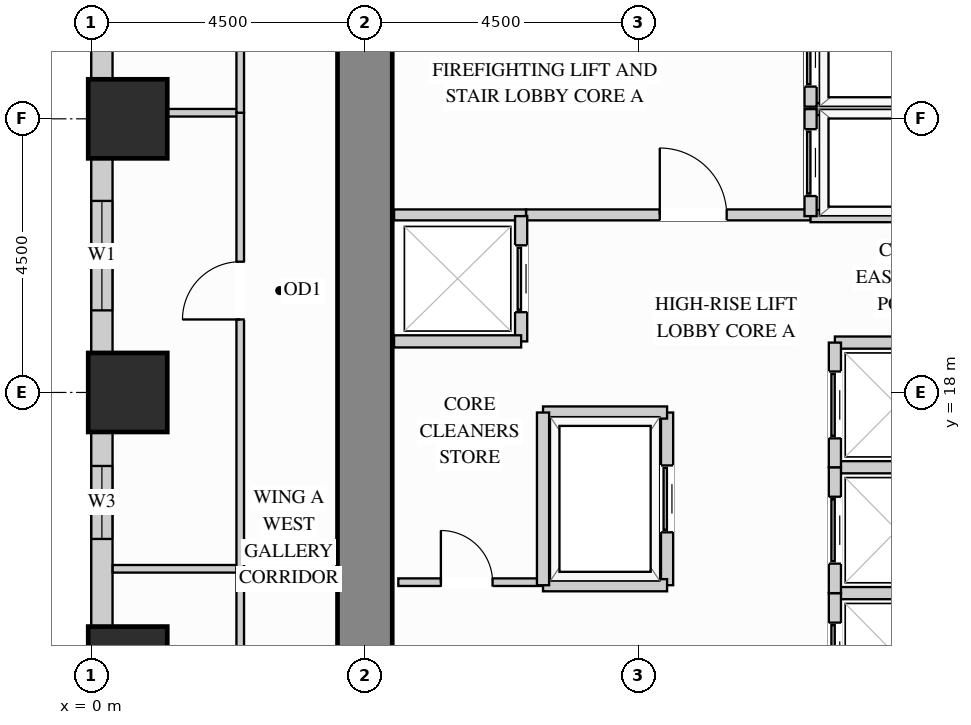
"""IFC4 building model, lengths in metres.
Left out: names, types, materials, properties, quantities, classifications, styles, units other than length and angle.
Written with IfcOpenShell. Run it as: python <this file> out.ifc"""

import sys

from ifc_helpers import new_model, si_unit, direction, frame, frame_2d, origin, origin_2d, place, context, subcontext, project, spatial, rectangle, extrude, source, transform, mapped, element, fill, save


model = new_model("IFC4")
c1 = context("Model", 3, precision=1e-05, world=origin(), true_north=direction((0.0, 1.0)))
c2 = subcontext(c1, "Body", "Model", "MODEL_VIEW")
j1 = project(units=[si_unit("LENGTHUNIT", "METRE"), si_unit("PLANEANGLEUNIT", "RADIAN")], contexts=[c1])
p1 = place(None, origin())
s1 = spatial("IfcSite", under=j1, at=p1, CompositionType="ELEMENT")
p2 = place(p1, origin())
s2 = spatial("IfcBuilding", under=s1, at=p2, CompositionType="ELEMENT")
p3 = place(p2, frame((0.0, 0.0, 58.5)))
s3 = spatial("IfcBuildingStorey", under=s2, at=p3, CompositionType="ELEMENT", Elevation=58.5)
m1 = source(origin(), c2, "Body", "SweptSolid", [
    extrude(rectangle(XDim=1.3, YDim=1.3, at=origin_2d()), origin(), (0.0, 0.0, 1.0), 3.38),
])
for number, where, z_axis, x_axis in (
    (1, (0.6, 13.5, 0.0), (0.0, 0.0, 1.0), (1.0, 0.0, 0.0)),
    (2, (0.6, 18.0, 0.0), (0.0, 0.0, 1.0), (1.0, 0.0, 0.0)),
    (3, (0.6, 22.5, 0.0), (0.0, 0.0, 1.0), (1.0, 0.0, 0.0)),
):
    element("IfcColumn", number, at=place(p3, frame(where, z_axis=z_axis, x_axis=x_axis)), inside=s3, PredefinedType="COLUMN", context=c2, shape_type="MappedRepresentation", body=[
        mapped(m1, transform((0.0, 0.0, 0.0), x_axis=(1.0, 0.0, 0.0), y_axis=(0.0, 1.0, 0.0), z_axis=(0.0, 0.0, 1.0))),
    ])
m2 = source(origin(), c2, "Body", "SweptSolid", [
    extrude(rectangle(XDim=20.1, YDim=0.9, at=frame_2d((10.05, 0.0))), origin(), (0.0, 0.0, 1.0), 3.38),
])
p4 = place(p3, frame((4.5, 8.95, 0.0), z_axis=(0.0, 0.0, 1.0), x_axis=(0.0, 1.0, 0.0)))
e4 = element("IfcWall", 4, at=p4, inside=s3, PredefinedType="SHEAR", context=c2, shape_type="MappedRepresentation", body=[
    mapped(m2, transform((0.0, 0.0, 0.0), x_axis=(1.0, 0.0, 0.0), y_axis=(0.0, 1.0, 0.0), z_axis=(0.0, 0.0, 1.0))),
])
p5 = place(p3, frame((0.175, 26.152, 0.0), z_axis=(0.0, 0.0, 1.0), x_axis=(0.0, -1.0, 0.0)))
e5 = element("IfcWall", 5, at=p5, inside=s3, PredefinedType="SOLIDWALL", context=c2, shape_type="SweptSolid", body=[
    extrude(rectangle(XDim=3.004, YDim=0.35, at=frame_2d((1.502, 0.0))), origin(), (0.0, 0.0, 1.0), 2.51),
])
p6 = place(p5, frame((0.602, 0.0, 0.78)))
e6 = element("IfcOpeningElement", 6, at=p6, cuts=e5, PredefinedType="OPENING", context=c2, shape_type="SweptSolid", body=[
    extrude(rectangle(XDim=1.8, YDim=1.55, at=frame_2d((0.9, 0.775))), frame((0.0, 0.185, 0.0), z_axis=(0.0, -1.0, 0.0), x_axis=(1.0, 0.0, 0.0)), (0.0, 0.0, 1.0), 0.37),
])
p7 = place(p3, frame((0.175, 21.852, 0.0), z_axis=(0.0, 0.0, 1.0), x_axis=(0.0, -1.0, 0.0)))
e7 = element("IfcWall", 7, at=p7, inside=s3, PredefinedType="SOLIDWALL", context=c2, shape_type="SweptSolid", body=[
    extrude(rectangle(XDim=3.204, YDim=0.35, at=frame_2d((1.602, 0.0))), origin(), (0.0, 0.0, 1.0), 2.51),
])
p8 = place(p7, frame((0.702, 0.0, 0.78)))
e8 = element("IfcOpeningElement", 8, at=p8, cuts=e7, PredefinedType="OPENING", context=c2, shape_type="SweptSolid", body=[
    extrude(rectangle(XDim=1.8, YDim=1.55, at=frame_2d((0.9, 0.775))), frame((0.0, 0.185, 0.0), z_axis=(0.0, -1.0, 0.0), x_axis=(1.0, 0.0, 0.0)), (0.0, 0.0, 1.0), 0.37),
])
p9 = place(p3, frame((0.175, 17.352, 0.0), z_axis=(0.0, 0.0, 1.0), x_axis=(0.0, -1.0, 0.0)))
e9 = element("IfcWall", 9, at=p9, inside=s3, PredefinedType="SOLIDWALL", context=c2, shape_type="SweptSolid", body=[
    extrude(rectangle(XDim=3.204, YDim=0.35, at=frame_2d((1.602, 0.0))), origin(), (0.0, 0.0, 1.0), 2.51),
])
p10 = place(p9, frame((0.561, 0.0, 0.78)))
e10 = element("IfcOpeningElement", 10, at=p10, cuts=e9, PredefinedType="OPENING", context=c2, shape_type="SweptSolid", body=[
    extrude(rectangle(XDim=1.2, YDim=1.55, at=frame_2d((0.6, 0.775))), frame((0.0, 0.185, 0.0), z_axis=(0.0, -1.0, 0.0), x_axis=(1.0, 0.0, 0.0)), (0.0, 0.0, 1.0), 0.37),
])
p11 = place(p3, frame((7.15, 20.92, 0.0), z_axis=(0.0, 0.0, 1.0), x_axis=(1.0, 0.0, 0.0)))
e11 = element("IfcWall", 11, at=p11, inside=s3, PredefinedType="PARTITIONING", context=c2, shape_type="SweptSolid", body=[
    extrude(rectangle(XDim=4.68, YDim=0.18, at=frame_2d((2.34, 0.0))), origin(), (0.0, 0.0, 1.0), 3.365),
])
p12 = place(p11, frame((2.2, 0.0, 0.0)))
e12 = element("IfcOpeningElement", 12, at=p12, cuts=e11, PredefinedType="OPENING", context=c2, shape_type="SweptSolid", body=[
    extrude(rectangle(XDim=1.1, YDim=2.15, at=frame_2d((0.55, 1.075))), frame((0.0, 0.1, 0.0), z_axis=(0.0, -1.0, 0.0), x_axis=(1.0, 0.0, 0.0)), (0.0, 0.0, 1.0), 0.2),
])
m3 = source(origin(), c2, "Body", "SweptSolid", [
    extrude(rectangle(XDim=2.17, YDim=0.18, at=frame_2d((1.085, 0.0))), origin(), (0.0, 0.0, 1.0), 3.365),
])
p13 = place(p3, frame((4.98, 20.92, 0.0), z_axis=(0.0, 0.0, 1.0), x_axis=(1.0, 0.0, 0.0)))
e13 = element("IfcWall", 13, at=p13, inside=s3, PredefinedType="PARTITIONING", context=c2, shape_type="MappedRepresentation", body=[
    mapped(m3, transform((0.0, 0.0, 0.0), x_axis=(1.0, 0.0, 0.0), y_axis=(0.0, 1.0, 0.0), z_axis=(0.0, 0.0, 1.0))),
])
p14 = place(p3, frame((5.05, 14.88, 0.0), z_axis=(0.0, 0.0, 1.0), x_axis=(1.0, 0.0, 0.0)))
e14 = element("IfcWall", 14, at=p14, inside=s3, PredefinedType="PARTITIONING", context=c2, shape_type="SweptSolid", body=[
    extrude(rectangle(XDim=2.35, YDim=0.125, at=frame_2d((1.175, 0.0))), origin(), (0.0, 0.0, 1.0), 3.365),
])
p15 = place(p14, frame((0.7, 0.0, 0.0)))
e15 = element("IfcOpeningElement", 15, at=p15, cuts=e14, PredefinedType="OPENING", context=c2, shape_type="SweptSolid", body=[
    extrude(rectangle(XDim=0.85, YDim=2.1, at=frame_2d((0.425, 1.05))), frame((0.0, 0.073, 0.0), z_axis=(0.0, -1.0, 0.0), x_axis=(1.0, 0.0, 0.0)), (0.0, 0.0, 1.0), 0.145),
])
m4 = source(origin(), c2, "Body", "SweptSolid", [
    extrude(rectangle(XDim=2.098, YDim=0.125, at=frame_2d((1.049, 0.0))), origin(), (0.0, 0.0, 1.0), 3.365),
])
p16 = place(p3, frame((0.352, 15.1, 0.0), z_axis=(0.0, 0.0, 1.0), x_axis=(1.0, 0.0, 0.0)))
e16 = element("IfcWall", 16, at=p16, inside=s3, PredefinedType="PARTITIONING", context=c2, shape_type="MappedRepresentation", body=[
    mapped(m4, transform((0.0, 0.0, 0.0), x_axis=(1.0, 0.0, 0.0), y_axis=(0.0, 1.0, 0.0), z_axis=(0.0, 0.0, 1.0))),
])
m5 = source(origin(), c2, "Body", "SweptSolid", [
    extrude(rectangle(XDim=1.19, YDim=0.125, at=frame_2d((0.595, 0.0))), origin(), (0.0, 0.0, 1.0), 3.365),
])
p17 = place(p3, frame((1.26, 22.6, 0.0), z_axis=(0.0, 0.0, 1.0), x_axis=(1.0, 0.0, 0.0)))
e17 = element("IfcWall", 17, at=p17, inside=s3, PredefinedType="PARTITIONING", context=c2, shape_type="MappedRepresentation", body=[
    mapped(m5, transform((0.0, 0.0, 0.0), x_axis=(1.0, 0.0, 0.0), y_axis=(0.0, 1.0, 0.0), z_axis=(0.0, 0.0, 1.0))),
])
p18 = place(p3, frame((2.45, 7.85, 0.0), z_axis=(0.0, 0.0, 1.0), x_axis=(0.0, 1.0, 0.0)))
e18 = element("IfcWall", 18, at=p18, inside=s3, PredefinedType="PARTITIONING", context=c2, shape_type="SweptSolid", body=[
    extrude(rectangle(XDim=7.25, YDim=0.125, at=frame_2d((3.625, 0.0))), origin(), (0.0, 0.0, 1.0), 3.365),
])
p19 = place(p18, frame((3.15, 0.0, 0.0)))
e19 = element("IfcOpeningElement", 19, at=p19, cuts=e18, PredefinedType="OPENING", context=c2, shape_type="SweptSolid", body=[
    extrude(rectangle(XDim=0.95, YDim=2.15, at=frame_2d((0.475, 1.075))), frame((0.0, 0.073, 0.0), z_axis=(0.0, -1.0, 0.0), x_axis=(1.0, 0.0, 0.0)), (0.0, 0.0, 1.0), 0.145),
])
p20 = place(p3, frame((2.45, 15.1, 0.0), z_axis=(0.0, 0.0, 1.0), x_axis=(0.0, 1.0, 0.0)))
e20 = element("IfcWall", 20, at=p20, inside=s3, PredefinedType="PARTITIONING", context=c2, shape_type="SweptSolid", body=[
    extrude(rectangle(XDim=7.5, YDim=0.125, at=frame_2d((3.75, 0.0))), origin(), (0.0, 0.0, 1.0), 3.365),
])
p21 = place(p20, frame((4.1, 0.0, 0.0)))
e21 = element("IfcOpeningElement", 21, at=p21, cuts=e20, PredefinedType="OPENING", context=c2, shape_type="SweptSolid", body=[
    extrude(rectangle(XDim=0.95, YDim=2.15, at=frame_2d((0.475, 1.075))), frame((0.0, 0.073, 0.0), z_axis=(0.0, -1.0, 0.0), x_axis=(1.0, 0.0, 0.0)), (0.0, 0.0, 1.0), 0.145),
])
p22 = place(p3, frame((2.45, 22.6, 0.0), z_axis=(0.0, 0.0, 1.0), x_axis=(0.0, 1.0, 0.0)))
e22 = element("IfcWall", 22, at=p22, inside=s3, PredefinedType="PARTITIONING", context=c2, shape_type="SweptSolid", body=[
    extrude(rectangle(XDim=7.45, YDim=0.125, at=frame_2d((3.725, 0.0))), origin(), (0.0, 0.0, 1.0), 3.365),
])
p23 = place(p22, frame((2.227, 0.0, 0.0)))
e23 = element("IfcOpeningElement", 23, at=p23, cuts=e22, PredefinedType="OPENING", context=c2, shape_type="SweptSolid", body=[
    extrude(rectangle(XDim=0.95, YDim=2.15, at=frame_2d((0.475, 1.075))), frame((0.0, 0.073, 0.0), z_axis=(0.0, -1.0, 0.0), x_axis=(1.0, 0.0, 0.0)), (0.0, 0.0, 1.0), 0.145),
])
m6 = source(origin(), c2, "Body", "SweptSolid", [
    extrude(rectangle(XDim=2.19, YDim=0.2, at=frame_2d((1.095, 0.0))), origin(), (0.0, 0.0, 1.0), 3.365),
])
for number, where, z_axis, x_axis in (
    (24, (11.83, 22.66, 0.0), (0.0, 0.0, 1.0), (1.0, 0.0, 0.0)),
    (25, (11.83, 20.9, 0.0), (0.0, 0.0, 1.0), (1.0, 0.0, 0.0)),
):
    element("IfcWall", number, at=place(p3, frame(where, z_axis=z_axis, x_axis=x_axis)), inside=s3, PredefinedType="PARTITIONING", context=c2, shape_type="MappedRepresentation", body=[
        mapped(m6, transform((0.0, 0.0, 0.0), x_axis=(1.0, 0.0, 0.0), y_axis=(0.0, 1.0, 0.0), z_axis=(0.0, 0.0, 1.0))),
    ])
p24 = place(p3, frame((11.83, 20.9, 0.0), z_axis=(0.0, 0.0, 1.0), x_axis=(0.0, 1.0, 0.0)))
e26 = element("IfcWall", 26, at=p24, inside=s3, PredefinedType="PARTITIONING", context=c2, shape_type="SweptSolid", body=[
    extrude(rectangle(XDim=1.76, YDim=0.2, at=frame_2d((0.88, 0.0))), origin(), (0.0, 0.0, 1.0), 3.365),
])
p25 = place(p24, frame((0.33, 0.0, 0.0)))
e27 = element("IfcOpeningElement", 27, at=p25, cuts=e26, PredefinedType="OPENING", context=c2, shape_type="SweptSolid", body=[
    extrude(rectangle(XDim=1.1, YDim=2.2, at=frame_2d((0.55, 1.1))), frame((0.0, 0.11, 0.0), z_axis=(0.0, -1.0, 0.0), x_axis=(1.0, 0.0, 0.0)), (0.0, 0.0, 1.0), 0.22),
])
p26 = place(p3, frame((11.83, 22.7, 0.0), z_axis=(0.0, 0.0, 1.0), x_axis=(0.0, 1.0, 0.0)))
e28 = element("IfcWall", 28, at=p26, inside=s3, PredefinedType="PARTITIONING", context=c2, shape_type="SweptSolid", body=[
    extrude(rectangle(XDim=1.76, YDim=0.2, at=frame_2d((0.88, 0.0))), origin(), (0.0, 0.0, 1.0), 3.365),
])
p27 = place(p26, frame((0.33, 0.0, 0.0)))
e29 = element("IfcOpeningElement", 29, at=p27, cuts=e28, PredefinedType="OPENING", context=c2, shape_type="SweptSolid", body=[
    extrude(rectangle(XDim=1.1, YDim=2.2, at=frame_2d((0.55, 1.1))), frame((0.0, 0.11, 0.0), z_axis=(0.0, -1.0, 0.0), x_axis=(1.0, 0.0, 0.0)), (0.0, 0.0, 1.0), 0.22),
])
m7 = source(origin(), c2, "Body", "SweptSolid", [
    extrude(rectangle(XDim=1.79, YDim=0.2, at=frame_2d((0.895, 0.0))), origin(), (0.0, 0.0, 1.0), 3.365),
])
p28 = place(p3, frame((12.23, 14.7, 0.0), z_axis=(0.0, 0.0, 1.0), x_axis=(1.0, 0.0, 0.0)))
e30 = element("IfcWall", 30, at=p28, inside=s3, PredefinedType="PARTITIONING", context=c2, shape_type="MappedRepresentation", body=[
    mapped(m7, transform((0.0, 0.0, 0.0), x_axis=(1.0, 0.0, 0.0), y_axis=(0.0, 1.0, 0.0), z_axis=(0.0, 0.0, 1.0))),
])
p29 = place(p3, frame((12.23, 12.63, 0.0), z_axis=(0.0, 0.0, 1.0), x_axis=(0.0, 1.0, 0.0)))
e31 = element("IfcWall", 31, at=p29, inside=s3, PredefinedType="PARTITIONING", context=c2, shape_type="SweptSolid", body=[
    extrude(rectangle(XDim=2.07, YDim=0.2, at=frame_2d((1.035, 0.0))), origin(), (0.0, 0.0, 1.0), 3.365),
])
p30 = place(p29, frame((0.485, 0.0, 0.0)))
e32 = element("IfcOpeningElement", 32, at=p30, cuts=e31, PredefinedType="OPENING", context=c2, shape_type="SweptSolid", body=[
    extrude(rectangle(XDim=1.1, YDim=2.2, at=frame_2d((0.55, 1.1))), frame((0.0, 0.11, 0.0), z_axis=(0.0, -1.0, 0.0), x_axis=(1.0, 0.0, 0.0)), (0.0, 0.0, 1.0), 0.22),
])
p31 = place(p3, frame((12.23, 16.77, 0.0), z_axis=(0.0, 0.0, 1.0), x_axis=(1.0, 0.0, 0.0)))
e33 = element("IfcWall", 33, at=p31, inside=s3, PredefinedType="PARTITIONING", context=c2, shape_type="MappedRepresentation", body=[
    mapped(m7, transform((0.0, 0.0, 0.0), x_axis=(1.0, 0.0, 0.0), y_axis=(0.0, 1.0, 0.0), z_axis=(0.0, 0.0, 1.0))),
])
p32 = place(p3, frame((12.23, 14.7, 0.0), z_axis=(0.0, 0.0, 1.0), x_axis=(0.0, 1.0, 0.0)))
e34 = element("IfcWall", 34, at=p32, inside=s3, PredefinedType="PARTITIONING", context=c2, shape_type="SweptSolid", body=[
    extrude(rectangle(XDim=2.07, YDim=0.2, at=frame_2d((1.035, 0.0))), origin(), (0.0, 0.0, 1.0), 3.365),
])
p33 = place(p32, frame((0.485, 0.0, 0.0)))
e35 = element("IfcOpeningElement", 35, at=p33, cuts=e34, PredefinedType="OPENING", context=c2, shape_type="SweptSolid", body=[
    extrude(rectangle(XDim=1.1, YDim=2.2, at=frame_2d((0.55, 1.1))), frame((0.0, 0.11, 0.0), z_axis=(0.0, -1.0, 0.0), x_axis=(1.0, 0.0, 0.0)), (0.0, 0.0, 1.0), 0.22),
])
p34 = place(p3, frame((12.23, 18.82, 0.0), z_axis=(0.0, 0.0, 1.0), x_axis=(1.0, 0.0, 0.0)))
e36 = element("IfcWall", 36, at=p34, inside=s3, PredefinedType="PARTITIONING", context=c2, shape_type="MappedRepresentation", body=[
    mapped(m7, transform((0.0, 0.0, 0.0), x_axis=(1.0, 0.0, 0.0), y_axis=(0.0, 1.0, 0.0), z_axis=(0.0, 0.0, 1.0))),
])
p35 = place(p3, frame((12.23, 16.77, 0.0), z_axis=(0.0, 0.0, 1.0), x_axis=(0.0, 1.0, 0.0)))
e37 = element("IfcWall", 37, at=p35, inside=s3, PredefinedType="PARTITIONING", context=c2, shape_type="SweptSolid", body=[
    extrude(rectangle(XDim=2.05, YDim=0.2, at=frame_2d((1.025, 0.0))), origin(), (0.0, 0.0, 1.0), 3.365),
])
p36 = place(p35, frame((0.475, 0.0, 0.0)))
e38 = element("IfcOpeningElement", 38, at=p36, cuts=e37, PredefinedType="OPENING", context=c2, shape_type="SweptSolid", body=[
    extrude(rectangle(XDim=1.1, YDim=2.2, at=frame_2d((0.55, 1.1))), frame((0.0, 0.11, 0.0), z_axis=(0.0, -1.0, 0.0), x_axis=(1.0, 0.0, 0.0)), (0.0, 0.0, 1.0), 0.22),
])
p37 = place(p3, frame((7.07, 18.84, 0.0), z_axis=(0.0, 0.0, 1.0), x_axis=(0.0, 1.0, 0.0)))
e39 = element("IfcWall", 39, at=p37, inside=s3, PredefinedType="PARTITIONING", context=c2, shape_type="SweptSolid", body=[
    extrude(rectangle(XDim=2.06, YDim=0.2, at=frame_2d((1.03, 0.0))), origin(), (0.0, 0.0, 1.0), 3.365),
])
p38 = place(p37, frame((0.48, 0.0, 0.0)))
e40 = element("IfcOpeningElement", 40, at=p38, cuts=e39, PredefinedType="OPENING", context=c2, shape_type="SweptSolid", body=[
    extrude(rectangle(XDim=1.1, YDim=2.2, at=frame_2d((0.55, 1.1))), frame((0.0, 0.11, 0.0), z_axis=(0.0, -1.0, 0.0), x_axis=(1.0, 0.0, 0.0)), (0.0, 0.0, 1.0), 0.22),
])
m8 = source(origin(), c2, "Body", "SweptSolid", [
    extrude(rectangle(XDim=2.09, YDim=0.2, at=frame_2d((1.045, 0.0))), origin(), (0.0, 0.0, 1.0), 3.365),
])
p39 = place(p3, frame((4.98, 18.84, 0.0), z_axis=(0.0, 0.0, 1.0), x_axis=(1.0, 0.0, 0.0)))
e41 = element("IfcWall", 41, at=p39, inside=s3, PredefinedType="PARTITIONING", context=c2, shape_type="MappedRepresentation", body=[
    mapped(m8, transform((0.0, 0.0, 0.0), x_axis=(1.0, 0.0, 0.0), y_axis=(0.0, 1.0, 0.0), z_axis=(0.0, 0.0, 1.0))),
])
p40 = place(p3, frame((9.47, 14.83, 0.0), z_axis=(0.0, 0.0, 1.0), x_axis=(0.0, 1.0, 0.0)))
e42 = element("IfcWall", 42, at=p40, inside=s3, PredefinedType="PARTITIONING", context=c2, shape_type="SweptSolid", body=[
    extrude(rectangle(XDim=2.84, YDim=0.2, at=frame_2d((1.42, 0.0))), origin(), (0.0, 0.0, 1.0), 3.365),
])
p41 = place(p40, frame((0.87, 0.0, 0.0)))
e43 = element("IfcOpeningElement", 43, at=p41, cuts=e42, PredefinedType="OPENING", context=c2, shape_type="SweptSolid", body=[
    extrude(rectangle(XDim=1.1, YDim=2.2, at=frame_2d((0.55, 1.1))), frame((0.0, 0.11, 0.0), z_axis=(0.0, -1.0, 0.0), x_axis=(1.0, 0.0, 0.0)), (0.0, 0.0, 1.0), 0.22),
])
m9 = source(origin(), c2, "Body", "SweptSolid", [
    extrude(rectangle(XDim=2.04, YDim=0.2, at=frame_2d((1.02, 0.0))), origin(), (0.0, 0.0, 1.0), 3.365),
])
for number, where, z_axis, x_axis in (
    (44, (7.43, 17.67, 0.0), (0.0, 0.0, 1.0), (1.0, 0.0, 0.0)),
    (45, (7.43, 14.83, 0.0), (0.0, 0.0, 1.0), (1.0, 0.0, 0.0)),
):
    element("IfcWall", number, at=place(p3, frame(where, z_axis=z_axis, x_axis=x_axis)), inside=s3, PredefinedType="PARTITIONING", context=c2, shape_type="MappedRepresentation", body=[
        mapped(m9, transform((0.0, 0.0, 0.0), x_axis=(1.0, 0.0, 0.0), y_axis=(0.0, 1.0, 0.0), z_axis=(0.0, 0.0, 1.0))),
    ])
m10 = source(origin(), c2, "Body", "SweptSolid", [
    extrude(rectangle(XDim=2.84, YDim=0.2, at=frame_2d((1.42, 0.0))), origin(), (0.0, 0.0, 1.0), 3.365),
])
p42 = place(p3, frame((7.43, 14.83, 0.0), z_axis=(0.0, 0.0, 1.0), x_axis=(0.0, 1.0, 0.0)))
e46 = element("IfcWall", 46, at=p42, inside=s3, PredefinedType="PARTITIONING", context=c2, shape_type="MappedRepresentation", body=[
    mapped(m10, transform((0.0, 0.0, 0.0), x_axis=(1.0, 0.0, 0.0), y_axis=(0.0, 1.0, 0.0), z_axis=(0.0, 0.0, 1.0))),
])
m11 = source(origin(), c2, "Body", "SweptSolid", [
    extrude(rectangle(XDim=1.1, YDim=2.15, at=frame_2d((0.55, 1.075))), frame((0.0, 0.025, 0.0), z_axis=(0.0, -1.0, 0.0), x_axis=(1.0, 0.0, 0.0)), (0.0, 0.0, 1.0), 0.05),
])
p43 = place(p12, origin())
e47 = element("IfcDoor", 47, at=p43, inside=s3, OperationType="SINGLE_SWING_LEFT", PredefinedType="DOOR", context=c2, shape_type="MappedRepresentation", body=[
    mapped(m11, transform((0.0, 0.0, 0.0), x_axis=(1.0, 0.0, 0.0), y_axis=(0.0, 1.0, 0.0), z_axis=(0.0, 0.0, 1.0))),
])
fill(e12, e47)
m12 = source(origin(), c2, "Body", "SweptSolid", [
    extrude(rectangle(XDim=1.1, YDim=2.2, at=frame_2d((0.55, 1.1))), frame((0.0, 0.025, 0.0), z_axis=(0.0, -1.0, 0.0), x_axis=(1.0, 0.0, 0.0)), (0.0, 0.0, 1.0), 0.05),
])
p44 = place(p25, origin())
e48 = element("IfcDoor", 48, at=p44, inside=s3, OperationType="SLIDING_TO_LEFT", PredefinedType="DOOR", context=c2, shape_type="MappedRepresentation", body=[
    mapped(m12, transform((0.0, 0.0, 0.0), x_axis=(1.0, 0.0, 0.0), y_axis=(0.0, 1.0, 0.0), z_axis=(0.0, 0.0, 1.0))),
])
fill(e27, e48)
p45 = place(p27, origin())
e49 = element("IfcDoor", 49, at=p45, inside=s3, OperationType="SLIDING_TO_LEFT", PredefinedType="DOOR", context=c2, shape_type="MappedRepresentation", body=[
    mapped(m12, transform((0.0, 0.0, 0.0), x_axis=(1.0, 0.0, 0.0), y_axis=(0.0, 1.0, 0.0), z_axis=(0.0, 0.0, 1.0))),
])
fill(e29, e49)
p46 = place(p30, origin())
e50 = element("IfcDoor", 50, at=p46, inside=s3, OperationType="SLIDING_TO_LEFT", PredefinedType="DOOR", context=c2, shape_type="MappedRepresentation", body=[
    mapped(m12, transform((0.0, 0.0, 0.0), x_axis=(1.0, 0.0, 0.0), y_axis=(0.0, 1.0, 0.0), z_axis=(0.0, 0.0, 1.0))),
])
fill(e32, e50)
p47 = place(p33, origin())
e51 = element("IfcDoor", 51, at=p47, inside=s3, OperationType="SLIDING_TO_LEFT", PredefinedType="DOOR", context=c2, shape_type="MappedRepresentation", body=[
    mapped(m12, transform((0.0, 0.0, 0.0), x_axis=(1.0, 0.0, 0.0), y_axis=(0.0, 1.0, 0.0), z_axis=(0.0, 0.0, 1.0))),
])
fill(e35, e51)
p48 = place(p36, origin())
e52 = element("IfcDoor", 52, at=p48, inside=s3, OperationType="SLIDING_TO_LEFT", PredefinedType="DOOR", context=c2, shape_type="MappedRepresentation", body=[
    mapped(m12, transform((0.0, 0.0, 0.0), x_axis=(1.0, 0.0, 0.0), y_axis=(0.0, 1.0, 0.0), z_axis=(0.0, 0.0, 1.0))),
])
fill(e38, e52)
p49 = place(p38, origin())
e53 = element("IfcDoor", 53, at=p49, inside=s3, OperationType="SLIDING_TO_LEFT", PredefinedType="DOOR", context=c2, shape_type="MappedRepresentation", body=[
    mapped(m12, transform((0.0, 0.0, 0.0), x_axis=(1.0, 0.0, 0.0), y_axis=(0.0, 1.0, 0.0), z_axis=(0.0, 0.0, 1.0))),
])
fill(e40, e53)
p50 = place(p41, origin())
e54 = element("IfcDoor", 54, at=p50, inside=s3, OperationType="SLIDING_TO_LEFT", PredefinedType="DOOR", context=c2, shape_type="MappedRepresentation", body=[
    mapped(m12, transform((0.0, 0.0, 0.0), x_axis=(1.0, 0.0, 0.0), y_axis=(0.0, 1.0, 0.0), z_axis=(0.0, 0.0, 1.0))),
])
fill(e43, e54)
m13 = source(origin(), c2, "Body", "SweptSolid", [
    extrude(rectangle(XDim=0.95, YDim=2.15, at=frame_2d((0.475, 1.075))), frame((0.0, 0.025, 0.0), z_axis=(0.0, -1.0, 0.0), x_axis=(1.0, 0.0, 0.0)), (0.0, 0.0, 1.0), 0.05),
])
p51 = place(p21, origin())
e55 = element("IfcDoor", 55, at=p51, inside=s3, OperationType="SINGLE_SWING_LEFT", PredefinedType="DOOR", context=c2, shape_type="MappedRepresentation", body=[
    mapped(m13, transform((0.0, 0.0, 0.0), x_axis=(1.0, 0.0, 0.0), y_axis=(0.0, 1.0, 0.0), z_axis=(0.0, 0.0, 1.0))),
])
fill(e21, e55)
m14 = source(origin(), c2, "Body", "SweptSolid", [
    extrude(rectangle(XDim=0.85, YDim=2.1, at=frame_2d((0.425, 1.05))), frame((0.0, 0.025, 0.0), z_axis=(0.0, -1.0, 0.0), x_axis=(1.0, 0.0, 0.0)), (0.0, 0.0, 1.0), 0.05),
])
p52 = place(p15, origin())
e56 = element("IfcDoor", 56, at=p52, inside=s3, OperationType="SINGLE_SWING_LEFT", PredefinedType="DOOR", context=c2, shape_type="MappedRepresentation", body=[
    mapped(m14, transform((0.0, 0.0, 0.0), x_axis=(1.0, 0.0, 0.0), y_axis=(0.0, 1.0, 0.0), z_axis=(0.0, 0.0, 1.0))),
])
fill(e15, e56)
m15 = source(origin(), c2, "Body", "SweptSolid", [
    extrude(rectangle(XDim=1.8, YDim=1.55, at=frame_2d((0.9, 0.775))), frame((0.0, 0.03, 0.0), z_axis=(0.0, -1.0, 0.0), x_axis=(1.0, 0.0, 0.0)), (0.0, 0.0, 1.0), 0.06),
])
p53 = place(p8, origin())
e57 = element("IfcWindow", 57, at=p53, inside=s3, PartitioningType="SINGLE_PANEL", PredefinedType="WINDOW", context=c2, shape_type="MappedRepresentation", body=[
    mapped(m15, transform((0.0, 0.0, 0.0), x_axis=(1.0, 0.0, 0.0), y_axis=(0.0, 1.0, 0.0), z_axis=(0.0, 0.0, 1.0))),
])
fill(e8, e57)
m16 = source(origin(), c2, "Body", "SweptSolid", [
    extrude(rectangle(XDim=1.2, YDim=1.55, at=frame_2d((0.6, 0.775))), frame((0.0, 0.03, 0.0), z_axis=(0.0, -1.0, 0.0), x_axis=(1.0, 0.0, 0.0)), (0.0, 0.0, 1.0), 0.06),
])
p54 = place(p10, origin())
e58 = element("IfcWindow", 58, at=p54, inside=s3, PartitioningType="SINGLE_PANEL", PredefinedType="WINDOW", context=c2, shape_type="MappedRepresentation", body=[
    mapped(m16, transform((0.0, 0.0, 0.0), x_axis=(1.0, 0.0, 0.0), y_axis=(0.0, 1.0, 0.0), z_axis=(0.0, 0.0, 1.0))),
])
fill(e10, e58)
save(model, sys.argv[1])
